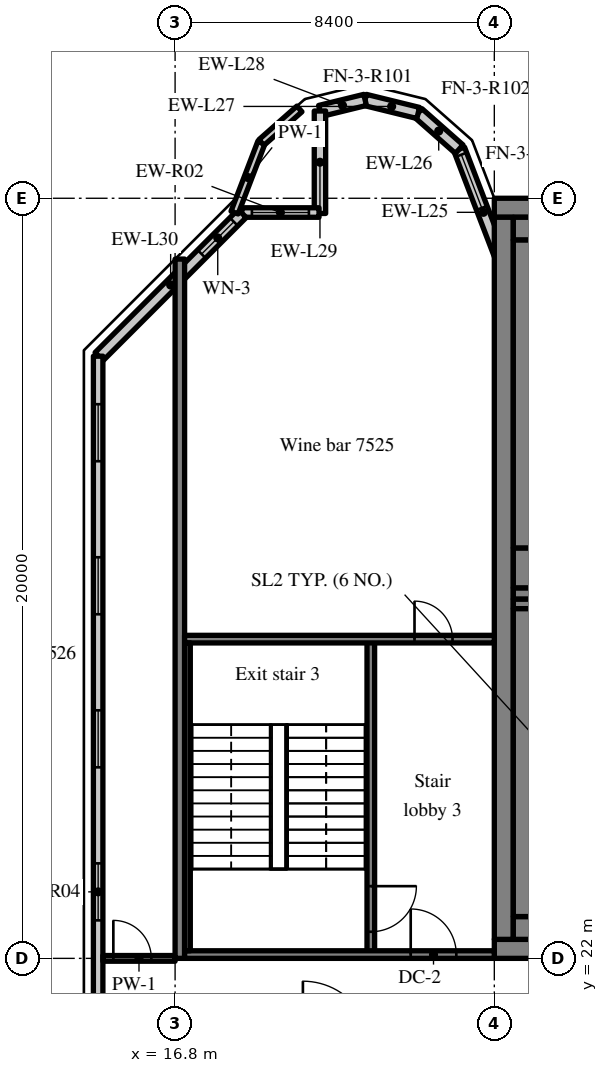
"""IFC4 building model, lengths in metres.
Left out: names, types, materials, properties, quantities, classifications, styles, units other than length and angle.
Written with IfcOpenShell. Run it as: python <this file> out.ifc"""

import sys

from ifc_helpers import new_model, si_unit, direction, frame, frame_2d, origin, place, context, subcontext, project, spatial, rectangle, extrude, source, transform, mapped, element, fill, save


model = new_model("IFC4")
c1 = context("Model", 3, precision=1e-05, world=origin(), true_north=direction((0.0, 1.0)))
c2 = subcontext(c1, "Body", "Model", "MODEL_VIEW")
j1 = project(units=[si_unit("LENGTHUNIT", "METRE"), si_unit("PLANEANGLEUNIT", "RADIAN")], contexts=[c1])
p1 = place(None, origin())
s1 = spatial("IfcSite", under=j1, at=p1, CompositionType="ELEMENT")
p2 = place(p1, origin())
s2 = spatial("IfcBuilding", under=s1, at=p2, CompositionType="ELEMENT")
p3 = place(p2, frame((0.0, 0.0, 313.7)))
s3 = spatial("IfcBuildingStorey", under=s2, at=p3, CompositionType="ELEMENT", Elevation=313.7)
m1 = source(origin(), c2, "Body", "SweptSolid", [
    extrude(rectangle(XDim=50.4, YDim=0.5, at=frame_2d((25.2, 0.0))), origin(), (0.0, 0.0, 1.0), 3.72),
])
p4 = place(p3, frame((25.2, 22.25, 0.0), z_axis=(0.0, 0.0, 1.0), x_axis=(1.0, 0.0, 0.0)))
e1 = element("IfcWall", 1, at=p4, inside=s3, PredefinedType="SHEAR", context=c2, shape_type="MappedRepresentation", body=[
    mapped(m1, transform((0.0, 0.0, 0.0), scale=1.0)),
])
m2 = source(origin(), c2, "Body", "SweptSolid", [
    extrude(rectangle(XDim=1.8, YDim=2.1, at=frame_2d((0.9, 1.05))), frame((0.0, 0.26, 0.0), z_axis=(0.0, -1.0, 0.0), x_axis=(1.0, 0.0, 0.0)), (0.0, 0.0, 1.0), 0.52),
])
p5 = place(p4, frame((15.9, 0.0, 0.0)))
e2 = element("IfcOpeningElement", 2, at=p5, cuts=e1, PredefinedType="OPENING", context=c2, shape_type="MappedRepresentation", body=[
    mapped(m2, transform((0.0, 0.0, 0.0), scale=1.0)),
])
m3 = source(origin(), c2, "Body", "SweptSolid", [
    extrude(rectangle(XDim=0.9, YDim=2.1, at=frame_2d((0.45, 1.05))), frame((0.0, 0.26, 0.0), z_axis=(0.0, -1.0, 0.0), x_axis=(1.0, 0.0, 0.0)), (0.0, 0.0, 1.0), 0.52),
])
p6 = place(p4, frame((9.675, 0.0, 0.0)))
e3 = element("IfcOpeningElement", 3, at=p6, cuts=e1, PredefinedType="OPENING", context=c2, shape_type="MappedRepresentation", body=[
    mapped(m3, transform((0.0, 0.0, 0.0), scale=1.0)),
])
p7 = place(p4, frame((21.525, 0.0, 0.0)))
e4 = element("IfcOpeningElement", 4, at=p7, cuts=e1, PredefinedType="OPENING", context=c2, shape_type="MappedRepresentation", body=[
    mapped(m3, transform((0.0, 0.0, 0.0), scale=1.0)),
])
p8 = place(p4, frame((32.7, 0.0, 0.0)))
e5 = element("IfcOpeningElement", 5, at=p8, cuts=e1, PredefinedType="OPENING", context=c2, shape_type="MappedRepresentation", body=[
    mapped(m2, transform((0.0, 0.0, 0.0), scale=1.0)),
])
m4 = source(origin(), c2, "Body", "SweptSolid", [
    extrude(rectangle(XDim=1.2, YDim=2.1, at=frame_2d((0.6, 1.05))), frame((0.0, 0.26, 0.0), z_axis=(0.0, -1.0, 0.0), x_axis=(1.0, 0.0, 0.0)), (0.0, 0.0, 1.0), 0.52),
])
p9 = place(p4, frame((6.5, 0.0, 0.0)))
e6 = element("IfcOpeningElement", 6, at=p9, cuts=e1, PredefinedType="OPENING", context=c2, shape_type="MappedRepresentation", body=[
    mapped(m4, transform((0.0, 0.0, 0.0), scale=1.0)),
])
p10 = place(p4, frame((47.975, 0.0, 0.0)))
e7 = element("IfcOpeningElement", 7, at=p10, cuts=e1, PredefinedType="OPENING", context=c2, shape_type="MappedRepresentation", body=[
    mapped(m4, transform((0.0, 0.0, 0.0), scale=1.0)),
])
p11 = place(p3, frame((25.2, 41.75, 0.0), z_axis=(0.0, 0.0, 1.0), x_axis=(1.0, 0.0, 0.0)))
e8 = element("IfcWall", 8, at=p11, inside=s3, PredefinedType="SHEAR", context=c2, shape_type="MappedRepresentation", body=[
    mapped(m1, transform((0.0, 0.0, 0.0), scale=1.0)),
])
m5 = source(origin(), c2, "Body", "SweptSolid", [
    extrude(rectangle(XDim=19.0, YDim=0.5, at=frame_2d((9.5, 0.0))), origin(), (0.0, 0.0, 1.0), 3.72),
])
p12 = place(p3, frame((25.45, 22.5, 0.0), z_axis=(0.0, 0.0, 1.0), x_axis=(0.0, 1.0, 0.0)))
e9 = element("IfcWall", 9, at=p12, inside=s3, PredefinedType="SHEAR", context=c2, shape_type="MappedRepresentation", body=[
    mapped(m5, transform((0.0, 0.0, 0.0), scale=1.0)),
])
m6 = source(origin(), c2, "Body", "SweptSolid", [
    extrude(rectangle(XDim=7.75, YDim=0.3, at=frame_2d((3.875, 0.0))), origin(), (0.0, 0.0, 1.0), 3.72),
])
p13 = place(p3, frame((25.7, 31.6, 0.0), z_axis=(0.0, 0.0, 1.0), x_axis=(1.0, 0.0, 0.0)))
e10 = element("IfcWall", 10, at=p13, inside=s3, PredefinedType="SHEAR", context=c2, shape_type="MappedRepresentation", body=[
    mapped(m6, transform((0.0, 0.0, 0.0), scale=1.0)),
])
m7 = source(origin(), c2, "Body", "SweptSolid", [
    extrude(rectangle(XDim=1.1, YDim=2.1, at=frame_2d((0.55, 1.05))), frame((0.0, 0.16, 0.0), z_axis=(0.0, -1.0, 0.0), x_axis=(1.0, 0.0, 0.0)), (0.0, 0.0, 1.0), 0.32),
])
p14 = place(p13, frame((6.05, 0.0, 0.0)))
e11 = element("IfcOpeningElement", 11, at=p14, cuts=e10, PredefinedType="OPENING", context=c2, shape_type="MappedRepresentation", body=[
    mapped(m7, transform((0.0, 0.0, 0.0), scale=1.0)),
])
m8 = source(origin(), c2, "Body", "SweptSolid", [
    extrude(rectangle(XDim=18.4, YDim=0.25, at=frame_2d((9.2, 0.0))), origin(), (0.0, 0.0, 1.0), 3.72),
])
p15 = place(p3, frame((16.925, 22.0, 0.0), z_axis=(0.0, 0.0, 1.0), x_axis=(0.0, 1.0, 0.0)))
e12 = element("IfcWall", 12, at=p15, inside=s3, PredefinedType="SHEAR", context=c2, shape_type="MappedRepresentation", body=[
    mapped(m8, transform((0.0, 0.0, 0.0), scale=1.0)),
])
m9 = source(origin(), c2, "Body", "SweptSolid", [
    extrude(rectangle(XDim=3.559, YDim=0.3, at=frame_2d((1.78, 0.0))), origin(), (0.0, 0.0, 1.0), 3.72),
])
p16 = place(p3, frame((25.55, 39.969, 0.0), z_axis=(0.0, 0.0, 1.0), x_axis=(-0.35779745313, 0.933799219604, 0.0)))
e13 = element("IfcWall", 13, at=p16, inside=s3, PredefinedType="SOLIDWALL", context=c2, shape_type="MappedRepresentation", body=[
    mapped(m9, transform((0.0, 0.0, 0.0), scale=1.0)),
])
m10 = source(origin(), c2, "Body", "SweptSolid", [
    extrude(rectangle(XDim=1.5, YDim=2.0, at=frame_2d((0.75, 1.0))), frame((0.0, 0.16, 0.0), z_axis=(0.0, -1.0, 0.0), x_axis=(1.0, 0.0, 0.0)), (0.0, 0.0, 1.0), 0.32),
])
p17 = place(p16, frame((1.903, 0.0, 0.9)))
e14 = element("IfcOpeningElement", 14, at=p17, cuts=e13, PredefinedType="OPENING", context=c2, shape_type="MappedRepresentation", body=[
    mapped(m10, transform((0.0, 0.0, 0.0), scale=1.0)),
])
m11 = source(origin(), c2, "Body", "SweptSolid", [
    extrude(rectangle(XDim=1.44, YDim=0.3, at=frame_2d((0.72, 0.0))), origin(), (0.0, 0.0, 1.0), 3.72),
])
p18 = place(p3, frame((24.277, 43.292, 0.0), z_axis=(0.0, 0.0, 1.0), x_axis=(-0.749649827867, 0.661834673902, 0.0)))
e15 = element("IfcWall", 15, at=p18, inside=s3, PredefinedType="SOLIDWALL", context=c2, shape_type="MappedRepresentation", body=[
    mapped(m11, transform((0.0, 0.0, 0.0), scale=1.0)),
])
m12 = source(origin(), c2, "Body", "SweptSolid", [
    extrude(rectangle(XDim=1.438, YDim=0.3, at=frame_2d((0.719, 0.0))), origin(), (0.0, 0.0, 1.0), 3.72),
])
p19 = place(p3, frame((23.197, 44.245, 0.0), z_axis=(0.0, 0.0, 1.0), x_axis=(-0.971152283879, 0.238460146601, 0.0)))
e16 = element("IfcWall", 16, at=p19, inside=s3, PredefinedType="SOLIDWALL", context=c2, shape_type="MappedRepresentation", body=[
    mapped(m12, transform((0.0, 0.0, 0.0), scale=1.0)),
])
m13 = source(origin(), c2, "Body", "SweptSolid", [
    extrude(rectangle(XDim=1.223, YDim=0.3, at=frame_2d((0.612, 0.0))), origin(), (0.0, 0.0, 1.0), 3.72),
])
p20 = place(p3, frame((21.8, 44.588, 0.0), z_axis=(0.0, 0.0, 1.0), x_axis=(-0.971143721305, -0.238495015816, 0.0)))
e17 = element("IfcWall", 17, at=p20, inside=s3, PredefinedType="SOLIDWALL", context=c2, shape_type="MappedRepresentation", body=[
    mapped(m13, transform((0.0, 0.0, 0.0), scale=1.0)),
])
m14 = source(origin(), c2, "Body", "SweptSolid", [
    extrude(rectangle(XDim=2.696, YDim=0.3, at=frame_2d((1.348, 0.0))), origin(), (0.0, 0.0, 1.0), 3.72),
])
p21 = place(p3, frame((20.612, 44.296, 0.0), z_axis=(0.0, 0.0, 1.0), x_axis=(0.0, -1.0, 0.0)))
e18 = element("IfcWall", 18, at=p21, inside=s3, PredefinedType="SOLIDWALL", context=c2, shape_type="MappedRepresentation", body=[
    mapped(m14, transform((0.0, 0.0, 0.0), scale=1.0)),
])
m15 = source(origin(), c2, "Body", "SweptSolid", [
    extrude(rectangle(XDim=2.031, YDim=0.25, at=frame_2d((1.016, 0.0))), origin(), (0.0, 0.0, 1.0), 3.17),
])
p22 = place(p3, frame((20.587, 41.625, 0.0), z_axis=(0.0, 0.0, 1.0), x_axis=(-1.0, 0.0, 0.0)))
e19 = element("IfcWall", 19, at=p22, inside=s3, PredefinedType="SOLIDWALL", context=c2, shape_type="MappedRepresentation", body=[
    mapped(m15, transform((0.0, 0.0, 0.0), scale=1.0)),
])
m16 = source(origin(), c2, "Body", "SweptSolid", [
    extrude(rectangle(XDim=1.5, YDim=1.5, at=frame_2d((0.75, 0.75))), frame((0.0, 0.135, 0.0), z_axis=(0.0, -1.0, 0.0), x_axis=(1.0, 0.0, 0.0)), (0.0, 0.0, 1.0), 0.27),
])
p23 = place(p22, frame((0.266, 0.0, 0.9)))
e20 = element("IfcOpeningElement", 20, at=p23, cuts=e19, PredefinedType="OPENING", context=c2, shape_type="MappedRepresentation", body=[
    mapped(m16, transform((0.0, 0.0, 0.0), scale=1.0)),
])
m17 = source(origin(), c2, "Body", "SweptSolid", [
    extrude(rectangle(XDim=5.326, YDim=0.3, at=frame_2d((2.663, 0.0))), origin(), (0.0, 0.0, 1.0), 3.72),
])
p24 = place(p3, frame((18.566, 41.6, 0.0), z_axis=(0.0, 0.0, 1.0), x_axis=(-0.707083859269, -0.707129702361, 0.0)))
e21 = element("IfcWall", 21, at=p24, inside=s3, PredefinedType="SOLIDWALL", context=c2, shape_type="MappedRepresentation", body=[
    mapped(m17, transform((0.0, 0.0, 0.0), scale=1.0)),
])
m18 = source(origin(), c2, "Body", "SweptSolid", [
    extrude(rectangle(XDim=1.2, YDim=1.5, at=frame_2d((0.6, 0.75))), frame((0.0, 0.16, 0.0), z_axis=(0.0, -1.0, 0.0), x_axis=(1.0, 0.0, 0.0)), (0.0, 0.0, 1.0), 0.32),
])
p25 = place(p24, frame((0.31, 0.0, 0.9)))
e22 = element("IfcOpeningElement", 22, at=p25, cuts=e21, PredefinedType="OPENING", context=c2, shape_type="MappedRepresentation", body=[
    mapped(m18, transform((0.0, 0.0, 0.0), scale=1.0)),
])
m19 = source(origin(), c2, "Body", "SweptSolid", [
    extrude(rectangle(XDim=28.189, YDim=0.25, at=frame_2d((14.095, 0.0))), origin(), (0.0, 0.0, 1.0), 3.72),
])
p26 = place(p3, frame((14.775, 37.845, 0.0), z_axis=(0.0, 0.0, 1.0), x_axis=(0.0, -1.0, 0.0)))
e23 = element("IfcWall", 23, at=p26, inside=s3, PredefinedType="SOLIDWALL", context=c2, shape_type="MappedRepresentation", body=[
    mapped(m19, transform((0.0, 0.0, 0.0), scale=1.0)),
])
p27 = place(p26, frame((1.263, 0.0, 0.9)))
e24 = element("IfcOpeningElement", 24, at=p27, cuts=e23, PredefinedType="OPENING", context=c2, shape_type="MappedRepresentation", body=[
    mapped(m16, transform((0.0, 0.0, 0.0), scale=1.0)),
])
p28 = place(p26, frame((5.291, 0.0, 0.9)))
e25 = element("IfcOpeningElement", 25, at=p28, cuts=e23, PredefinedType="OPENING", context=c2, shape_type="MappedRepresentation", body=[
    mapped(m16, transform((0.0, 0.0, 0.0), scale=1.0)),
])
p29 = place(p26, frame((9.318, 0.0, 0.9)))
e26 = element("IfcOpeningElement", 26, at=p29, cuts=e23, PredefinedType="OPENING", context=c2, shape_type="MappedRepresentation", body=[
    mapped(m16, transform((0.0, 0.0, 0.0), scale=1.0)),
])
p30 = place(p26, frame((13.345, 0.0, 0.9)))
e27 = element("IfcOpeningElement", 27, at=p30, cuts=e23, PredefinedType="OPENING", context=c2, shape_type="MappedRepresentation", body=[
    mapped(m16, transform((0.0, 0.0, 0.0), scale=1.0)),
])
p31 = place(p26, frame((17.372, 0.0, 0.9)))
e28 = element("IfcOpeningElement", 28, at=p31, cuts=e23, PredefinedType="OPENING", context=c2, shape_type="MappedRepresentation", body=[
    mapped(m16, transform((0.0, 0.0, 0.0), scale=1.0)),
])
p32 = place(p26, frame((21.399, 0.0, 0.9)))
e29 = element("IfcOpeningElement", 29, at=p32, cuts=e23, PredefinedType="OPENING", context=c2, shape_type="MappedRepresentation", body=[
    mapped(m16, transform((0.0, 0.0, 0.0), scale=1.0)),
])
p33 = place(p26, frame((25.426, 0.0, 0.9)))
e30 = element("IfcOpeningElement", 30, at=p33, cuts=e23, PredefinedType="OPENING", context=c2, shape_type="MappedRepresentation", body=[
    mapped(m16, transform((0.0, 0.0, 0.0), scale=1.0)),
])
m20 = source(origin(), c2, "Body", "SweptSolid", [
    extrude(rectangle(XDim=1.975, YDim=0.2, at=frame_2d((0.988, 0.0))), origin(), (0.0, 0.0, 1.0), 1.1),
])
p34 = place(p3, frame((18.365, 41.623, -0.05), z_axis=(0.0, 0.0, 1.0), x_axis=(0.357819264753, 0.933790861902, 0.0)))
e31 = element("IfcWall", 31, at=p34, inside=s3, PredefinedType="PARAPET", context=c2, shape_type="MappedRepresentation", body=[
    mapped(m20, transform((0.0, 0.0, 0.0), scale=1.0)),
])
m21 = source(origin(), c2, "Body", "SweptSolid", [
    extrude(rectangle(XDim=1.335, YDim=0.2, at=frame_2d((0.667, 0.0))), origin(), (0.0, 0.0, 1.0), 1.1),
])
p35 = place(p3, frame((19.072, 43.467, -0.05), z_axis=(0.0, 0.0, 1.0), x_axis=(0.749645640847, 0.661839416444, 0.0)))
e32 = element("IfcWall", 32, at=p35, inside=s3, PredefinedType="PARAPET", context=c2, shape_type="MappedRepresentation", body=[
    mapped(m21, transform((0.0, 0.0, 0.0), scale=1.0)),
])
m22 = source(origin(), c2, "Body", "SweptSolid", [
    extrude(rectangle(XDim=8.3, YDim=0.2, at=frame_2d((4.15, 0.0))), origin(), (0.0, 0.0, 1.0), 3.72),
])
p36 = place(p3, frame((21.95, 22.1, 0.0), z_axis=(0.0, 0.0, 1.0), x_axis=(0.0, 1.0, 0.0)))
e33 = element("IfcWall", 33, at=p36, inside=s3, PredefinedType="SOLIDWALL", context=c2, shape_type="MappedRepresentation", body=[
    mapped(m22, transform((0.0, 0.0, 0.0), scale=1.0)),
])
m23 = source(origin(), c2, "Body", "SweptSolid", [
    extrude(rectangle(XDim=1.2, YDim=2.1, at=frame_2d((0.6, 1.05))), frame((0.0, 0.11, 0.0), z_axis=(0.0, -1.0, 0.0), x_axis=(1.0, 0.0, 0.0)), (0.0, 0.0, 1.0), 0.22),
])
p37 = place(p36, frame((0.6, 0.0, 0.0)))
e34 = element("IfcOpeningElement", 34, at=p37, cuts=e33, PredefinedType="OPENING", context=c2, shape_type="MappedRepresentation", body=[
    mapped(m23, transform((0.0, 0.0, 0.0), scale=1.0)),
])
m24 = source(origin(), c2, "Body", "SweptSolid", [
    extrude(rectangle(XDim=8.15, YDim=0.2, at=frame_2d((4.075, 0.0))), origin(), (0.0, 0.0, 1.0), 3.72),
])
p38 = place(p3, frame((17.05, 22.1, 0.0), z_axis=(0.0, 0.0, 1.0), x_axis=(1.0, 0.0, 0.0)))
e35 = element("IfcWall", 35, at=p38, inside=s3, PredefinedType="SOLIDWALL", context=c2, shape_type="MappedRepresentation", body=[
    mapped(m24, transform((0.0, 0.0, 0.0), scale=1.0)),
])
p39 = place(p38, frame((5.95, 0.0, 0.0)))
e36 = element("IfcOpeningElement", 36, at=p39, cuts=e35, PredefinedType="OPENING", context=c2, shape_type="MappedRepresentation", body=[
    mapped(m23, transform((0.0, 0.0, 0.0), scale=1.0)),
])
p40 = place(p3, frame((17.05, 30.4, 0.0), z_axis=(0.0, 0.0, 1.0), x_axis=(1.0, 0.0, 0.0)))
e37 = element("IfcWall", 37, at=p40, inside=s3, PredefinedType="SOLIDWALL", context=c2, shape_type="MappedRepresentation", body=[
    mapped(m24, transform((0.0, 0.0, 0.0), scale=1.0)),
])
m25 = source(origin(), c2, "Body", "SweptSolid", [
    extrude(rectangle(XDim=1.0, YDim=2.1, at=frame_2d((0.5, 1.05))), frame((0.0, 0.11, 0.0), z_axis=(0.0, -1.0, 0.0), x_axis=(1.0, 0.0, 0.0)), (0.0, 0.0, 1.0), 0.22),
])
p41 = place(p40, frame((6.05, 0.0, 0.0)))
e38 = element("IfcOpeningElement", 38, at=p41, cuts=e37, PredefinedType="OPENING", context=c2, shape_type="MappedRepresentation", body=[
    mapped(m25, transform((0.0, 0.0, 0.0), scale=1.0)),
])
m26 = source(origin(), c2, "Body", "SweptSolid", [
    extrude(rectangle(XDim=5.25, YDim=0.6, at=frame_2d((2.625, 0.0))), origin(), (0.0, 0.0, 1.0), 3.72),
])
p42 = place(p3, frame((25.7, 22.8, 0.0), z_axis=(0.0, 0.0, 1.0), x_axis=(1.0, 0.0, 0.0)))
e39 = element("IfcWall", 39, at=p42, inside=s3, PredefinedType="SOLIDWALL", context=c2, shape_type="MappedRepresentation", body=[
    mapped(m26, transform((0.0, 0.0, 0.0), scale=1.0)),
])
m27 = source(origin(), c2, "Body", "SweptSolid", [
    extrude(rectangle(XDim=5.25, YDim=0.25, at=frame_2d((2.625, 0.0))), origin(), (0.0, 0.0, 1.0), 3.72),
])
p43 = place(p3, frame((25.7, 31.325, 0.0), z_axis=(0.0, 0.0, 1.0), x_axis=(1.0, 0.0, 0.0)))
e40 = element("IfcWall", 40, at=p43, inside=s3, PredefinedType="SOLIDWALL", context=c2, shape_type="MappedRepresentation", body=[
    mapped(m27, transform((0.0, 0.0, 0.0), scale=1.0)),
])
m28 = source(origin(), c2, "Body", "SweptSolid", [
    extrude(rectangle(XDim=8.1, YDim=0.6, at=frame_2d((4.05, 0.0))), origin(), (0.0, 0.0, 1.0), 3.72),
])
p44 = place(p3, frame((26.0, 23.1, 0.0), z_axis=(0.0, 0.0, 1.0), x_axis=(0.0, 1.0, 0.0)))
e41 = element("IfcWall", 41, at=p44, inside=s3, PredefinedType="SOLIDWALL", context=c2, shape_type="MappedRepresentation", body=[
    mapped(m28, transform((0.0, 0.0, 0.0), scale=1.0)),
])
m29 = source(origin(), c2, "Body", "SweptSolid", [
    extrude(rectangle(XDim=8.1, YDim=0.15, at=frame_2d((4.05, 0.0))), origin(), (0.0, 0.0, 1.0), 3.72),
])
p45 = place(p3, frame((17.125, 22.2, 0.0), z_axis=(0.0, 0.0, 1.0), x_axis=(0.0, 1.0, 0.0)))
e42 = element("IfcWall", 42, at=p45, inside=s3, PredefinedType="SOLIDWALL", context=c2, shape_type="MappedRepresentation", body=[
    mapped(m29, transform((0.0, 0.0, 0.0), scale=1.0)),
])
p46 = place(p3, frame((25.7, 41.2, 0.0), z_axis=(0.0, 0.0, 1.0), x_axis=(1.0, 0.0, 0.0)))
e43 = element("IfcWall", 43, at=p46, inside=s3, PredefinedType="SOLIDWALL", context=c2, shape_type="MappedRepresentation", body=[
    mapped(m26, transform((0.0, 0.0, 0.0), scale=1.0)),
])
m30 = source(origin(), c2, "Body", "SweptSolid", [
    extrude(rectangle(XDim=5.25, YDim=1.05, at=frame_2d((2.625, 0.0))), origin(), (0.0, 0.0, 1.0), 3.72),
])
p47 = place(p3, frame((25.7, 32.275, 0.0), z_axis=(0.0, 0.0, 1.0), x_axis=(1.0, 0.0, 0.0)))
e44 = element("IfcWall", 44, at=p47, inside=s3, PredefinedType="SOLIDWALL", context=c2, shape_type="MappedRepresentation", body=[
    mapped(m30, transform((0.0, 0.0, 0.0), scale=1.0)),
])
p48 = place(p3, frame((26.0, 32.8, 0.0), z_axis=(0.0, 0.0, 1.0), x_axis=(0.0, 1.0, 0.0)))
e45 = element("IfcWall", 45, at=p48, inside=s3, PredefinedType="SOLIDWALL", context=c2, shape_type="MappedRepresentation", body=[
    mapped(m28, transform((0.0, 0.0, 0.0), scale=1.0)),
])
m31 = source(origin(), c2, "Body", "SweptSolid", [
    extrude(rectangle(XDim=1.9, YDim=0.15, at=frame_2d((0.95, 0.0))), origin(), (0.0, 0.0, 1.0), 3.02),
])
p49 = place(p3, frame((14.9, 22.0, 0.0), z_axis=(0.0, 0.0, 1.0), x_axis=(1.0, 0.0, 0.0)))
e46 = element("IfcWall", 46, at=p49, inside=s3, PredefinedType="PARTITIONING", context=c2, shape_type="MappedRepresentation", body=[
    mapped(m31, transform((0.0, 0.0, 0.0), scale=1.0)),
])
m32 = source(origin(), c2, "Body", "SweptSolid", [
    extrude(rectangle(XDim=1.0, YDim=2.1, at=frame_2d((0.5, 1.05))), frame((0.0, 0.085, 0.0), z_axis=(0.0, -1.0, 0.0), x_axis=(1.0, 0.0, 0.0)), (0.0, 0.0, 1.0), 0.17),
])
p50 = place(p49, frame((0.275, 0.0, 0.0)))
e47 = element("IfcOpeningElement", 47, at=p50, cuts=e46, PredefinedType="OPENING", context=c2, shape_type="MappedRepresentation", body=[
    mapped(m32, transform((0.0, 0.0, 0.0), scale=1.0)),
])
m33 = source(origin(), c2, "Body", "SweptSolid", [
    extrude(rectangle(XDim=1.5, YDim=2.0, at=frame_2d((0.75, 1.0))), frame((0.0, 0.03, 0.0), z_axis=(0.0, -1.0, 0.0), x_axis=(1.0, 0.0, 0.0)), (0.0, 0.0, 1.0), 0.06),
])
p51 = place(p17, origin())
e48 = element("IfcWindow", 48, at=p51, inside=s3, PartitioningType="SINGLE_PANEL", PredefinedType="WINDOW", context=c2, shape_type="MappedRepresentation", body=[
    mapped(m33, transform((0.0, 0.0, 0.0), scale=1.0)),
])
fill(e14, e48)
m34 = source(origin(), c2, "Body", "SweptSolid", [
    extrude(rectangle(XDim=1.5, YDim=1.5, at=frame_2d((0.75, 0.75))), frame((0.0, 0.03, 0.0), z_axis=(0.0, -1.0, 0.0), x_axis=(1.0, 0.0, 0.0)), (0.0, 0.0, 1.0), 0.06),
])
p52 = place(p23, origin())
e49 = element("IfcWindow", 49, at=p52, inside=s3, PartitioningType="SINGLE_PANEL", PredefinedType="WINDOW", context=c2, shape_type="MappedRepresentation", body=[
    mapped(m34, transform((0.0, 0.0, 0.0), scale=1.0)),
])
fill(e20, e49)
m35 = source(origin(), c2, "Body", "SweptSolid", [
    extrude(rectangle(XDim=1.2, YDim=1.5, at=frame_2d((0.6, 0.75))), frame((0.0, 0.03, 0.0), z_axis=(0.0, -1.0, 0.0), x_axis=(1.0, 0.0, 0.0)), (0.0, 0.0, 1.0), 0.06),
])
p53 = place(p25, origin())
e50 = element("IfcWindow", 50, at=p53, inside=s3, PartitioningType="SINGLE_PANEL", PredefinedType="WINDOW", context=c2, shape_type="MappedRepresentation", body=[
    mapped(m35, transform((0.0, 0.0, 0.0), scale=1.0)),
])
fill(e22, e50)
p54 = place(p27, origin())
e51 = element("IfcWindow", 51, at=p54, inside=s3, PartitioningType="SINGLE_PANEL", PredefinedType="WINDOW", context=c2, shape_type="MappedRepresentation", body=[
    mapped(m34, transform((0.0, 0.0, 0.0), scale=1.0)),
])
fill(e24, e51)
p55 = place(p28, origin())
e52 = element("IfcWindow", 52, at=p55, inside=s3, PartitioningType="SINGLE_PANEL", PredefinedType="WINDOW", context=c2, shape_type="MappedRepresentation", body=[
    mapped(m34, transform((0.0, 0.0, 0.0), scale=1.0)),
])
fill(e25, e52)
p56 = place(p29, origin())
e53 = element("IfcWindow", 53, at=p56, inside=s3, PartitioningType="SINGLE_PANEL", PredefinedType="WINDOW", context=c2, shape_type="MappedRepresentation", body=[
    mapped(m34, transform((0.0, 0.0, 0.0), scale=1.0)),
])
fill(e26, e53)
p57 = place(p30, origin())
e54 = element("IfcWindow", 54, at=p57, inside=s3, PartitioningType="SINGLE_PANEL", PredefinedType="WINDOW", context=c2, shape_type="MappedRepresentation", body=[
    mapped(m34, transform((0.0, 0.0, 0.0), scale=1.0)),
])
fill(e27, e54)
m36 = source(origin(), c2, "Body", "SweptSolid", [
    extrude(rectangle(XDim=1.2, YDim=2.1, at=frame_2d((0.6, 1.05))), frame((0.0, 0.025, 0.0), z_axis=(0.0, -1.0, 0.0), x_axis=(1.0, 0.0, 0.0)), (0.0, 0.0, 1.0), 0.05),
])
p58 = place(p37, origin())
e55 = element("IfcDoor", 55, at=p58, inside=s3, OperationType="SINGLE_SWING_RIGHT", PredefinedType="DOOR", context=c2, shape_type="MappedRepresentation", body=[
    mapped(m36, transform((0.0, 0.0, 0.0), scale=1.0)),
])
fill(e34, e55)
p59 = place(p39, origin())
e56 = element("IfcDoor", 56, at=p59, inside=s3, OperationType="SINGLE_SWING_LEFT", PredefinedType="DOOR", context=c2, shape_type="MappedRepresentation", body=[
    mapped(m36, transform((0.0, 0.0, 0.0), scale=1.0)),
])
fill(e36, e56)
m37 = source(origin(), c2, "Body", "SweptSolid", [
    extrude(rectangle(XDim=1.0, YDim=2.1, at=frame_2d((0.5, 1.05))), frame((0.0, 0.025, 0.0), z_axis=(0.0, -1.0, 0.0), x_axis=(1.0, 0.0, 0.0)), (0.0, 0.0, 1.0), 0.05),
])
p60 = place(p41, origin())
e57 = element("IfcDoor", 57, at=p60, inside=s3, OperationType="SINGLE_SWING_LEFT", PredefinedType="DOOR", context=c2, shape_type="MappedRepresentation", body=[
    mapped(m37, transform((0.0, 0.0, 0.0), scale=1.0)),
])
fill(e38, e57)
p61 = place(p50, origin())
e58 = element("IfcDoor", 58, at=p61, inside=s3, OperationType="SINGLE_SWING_LEFT", PredefinedType="DOOR", context=c2, shape_type="MappedRepresentation", body=[
    mapped(m37, transform((0.0, 0.0, 0.0), scale=1.0)),
])
fill(e47, e58)
save(model, sys.argv[1])
